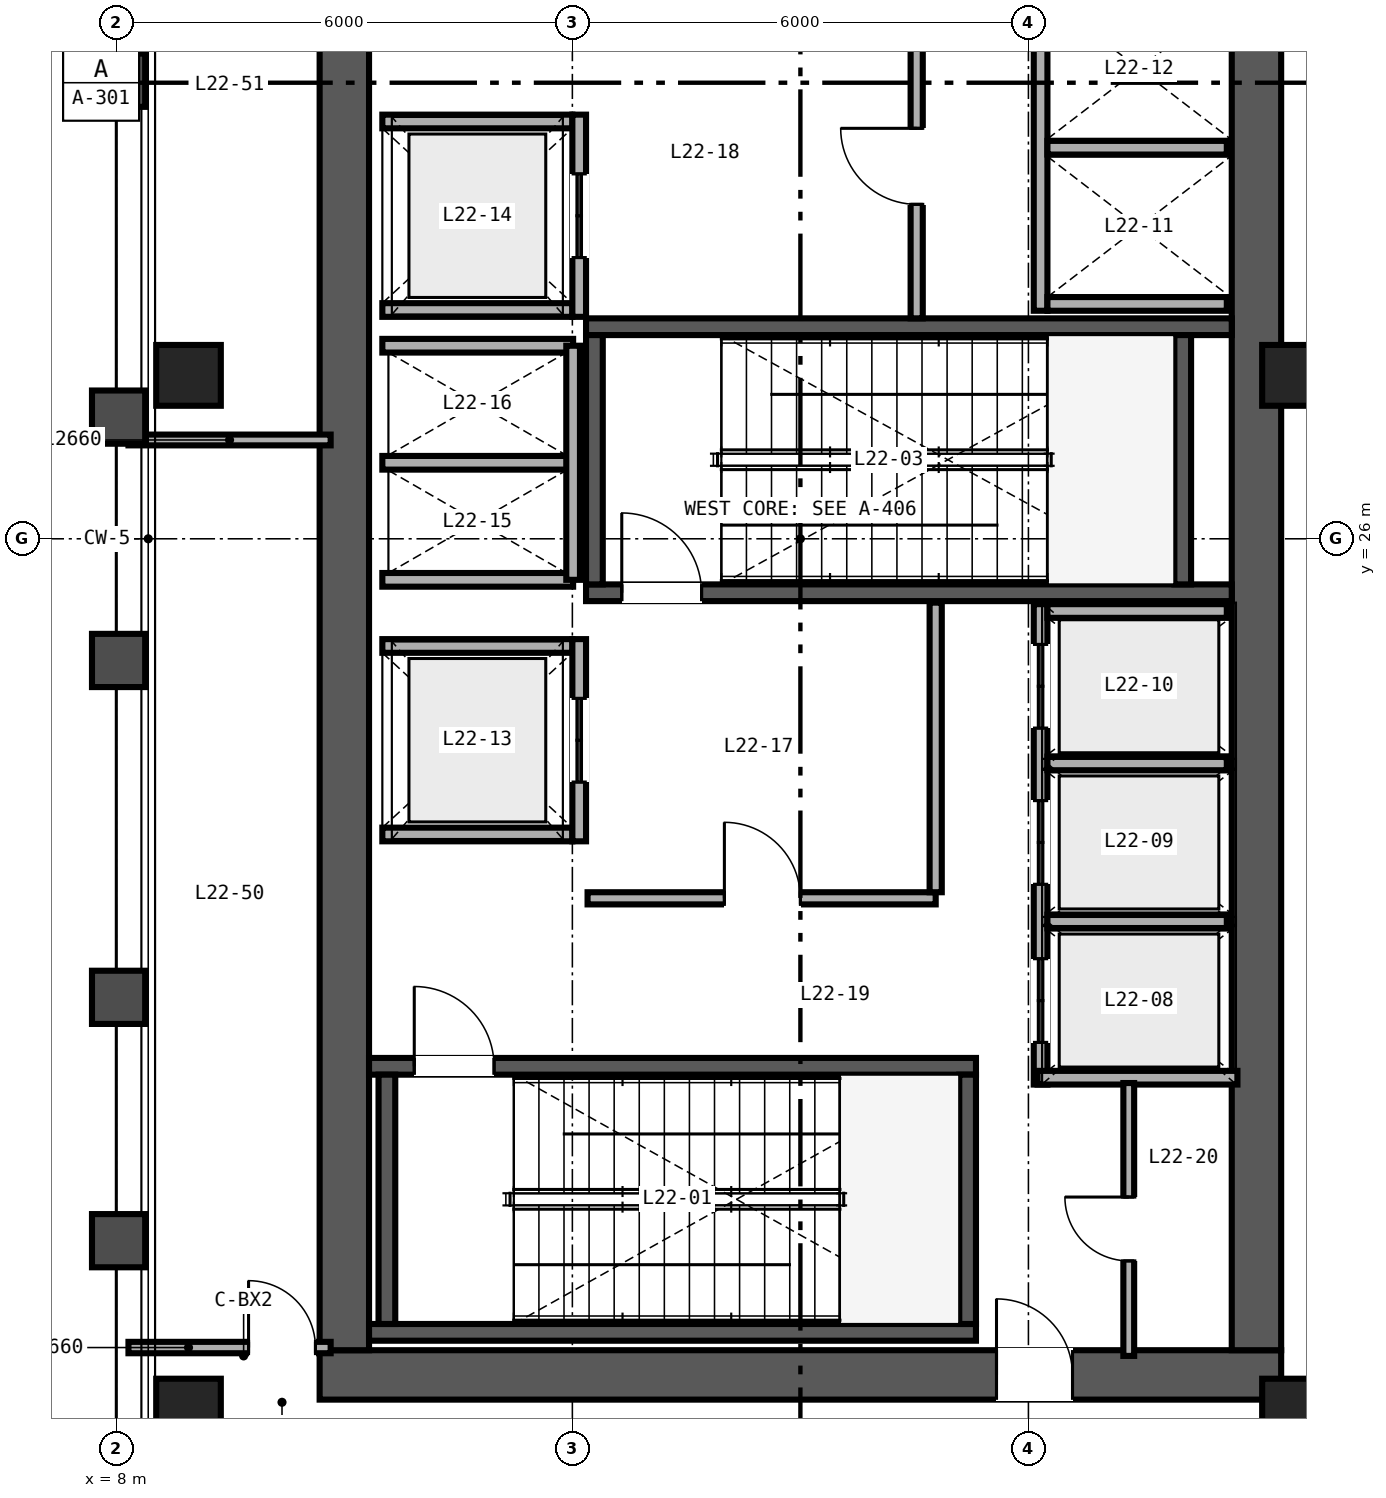
"""IFC4 building model, lengths in metres.
Left out: names, types, materials, properties, quantities, classifications, styles, units other than length and angle.
Written with IfcOpenShell. Run it as: python <this file> out.ifc"""

import sys

from ifc_helpers import new_model, si_unit, direction, frame, frame_2d, origin, origin_2d, place, context, subcontext, project, spatial, rectangle, hollow_rectangle, extrude, source, transform, mapped, element, fill, save


model = new_model("IFC4")
c1 = context("Model", 3, precision=1e-05, world=origin(), true_north=direction((0.0, 1.0)))
c2 = subcontext(c1, "Body", "Model", "MODEL_VIEW")
j1 = project(units=[si_unit("LENGTHUNIT", "METRE"), si_unit("PLANEANGLEUNIT", "RADIAN")], contexts=[c1])
p1 = place(None, origin())
s1 = spatial("IfcSite", under=j1, at=p1, CompositionType="ELEMENT")
p2 = place(p1, origin())
s2 = spatial("IfcBuilding", under=s1, at=p2, CompositionType="ELEMENT")
p3 = place(p2, frame((0.0, 0.0, 92.4)))
s3 = spatial("IfcBuildingStorey", under=s2, at=p3, CompositionType="ELEMENT", Elevation=92.4)
p4 = place(p3, frame((10.675, 15.0, 0.0), z_axis=(0.0, 0.0, 1.0), x_axis=(1.0, 0.0, 0.0)))
e1 = element("IfcWall", 1, at=p4, inside=s3, PredefinedType="SHEAR", context=c2, shape_type="SweptSolid", body=[
    extrude(rectangle(XDim=12.65, YDim=0.65, at=frame_2d((6.325, 0.0))), origin(), (0.0, 0.0, 1.0), 4.56),
])
p5 = place(p4, frame((8.905, 0.0, 0.0)))
e2 = element("IfcOpeningElement", 2, at=p5, cuts=e1, PredefinedType="OPENING", context=c2, shape_type="SweptSolid", body=[
    extrude(rectangle(XDim=1.0, YDim=2.15, at=frame_2d((0.5, 1.075))), frame((0.0, 0.335, 0.0), z_axis=(0.0, -1.0, 0.0), x_axis=(1.0, 0.0, 0.0)), (0.0, 0.0, 1.0), 0.67),
])
for number, where, z_axis, x_axis in (
    (3, (11.0, 15.325, 0.0), (0.0, 0.0, 1.0), (0.0, 1.0, 0.0)),
    (4, (23.0, 15.325, 0.0), (0.0, 0.0, 1.0), (0.0, 1.0, 0.0)),
):
    element("IfcWall", number, at=place(p3, frame(where, z_axis=z_axis, x_axis=x_axis)), inside=s3, PredefinedType="SHEAR", context=c2, shape_type="SweptSolid", body=[
        extrude(rectangle(XDim=21.35, YDim=0.65, at=frame_2d((10.675, 0.0))), origin(), (0.0, 0.0, 1.0), 4.56),
    ])
p6 = place(p3, frame((11.325, 15.56, 0.0), z_axis=(0.0, 0.0, 1.0), x_axis=(1.0, 0.0, 0.0)))
e5 = element("IfcWall", 5, at=p6, inside=s3, PredefinedType="SHEAR", context=c2, shape_type="SweptSolid", body=[
    extrude(rectangle(XDim=7.985, YDim=0.22, at=frame_2d((3.993, 0.0))), origin(), (0.0, 0.0, 1.0), 4.6),
])
p7 = place(p3, frame((11.325, 19.06, 0.0), z_axis=(0.0, 0.0, 1.0), x_axis=(1.0, 0.0, 0.0)))
e6 = element("IfcWall", 6, at=p7, inside=s3, PredefinedType="SHEAR", context=c2, shape_type="SweptSolid", body=[
    extrude(rectangle(XDim=7.985, YDim=0.22, at=frame_2d((3.993, 0.0))), origin(), (0.0, 0.0, 1.0), 4.6),
])
p8 = place(p7, frame((0.595, 0.0, 0.0)))
e7 = element("IfcOpeningElement", 7, at=p8, cuts=e6, PredefinedType="OPENING", context=c2, shape_type="SweptSolid", body=[
    extrude(rectangle(XDim=1.05, YDim=2.15, at=frame_2d((0.525, 1.075))), frame((0.0, 0.12, 0.0), z_axis=(0.0, -1.0, 0.0), x_axis=(1.0, 0.0, 0.0)), (0.0, 0.0, 1.0), 0.24),
])
for number, where, z_axis, x_axis in (
    (8, (11.56, 15.67, 0.0), (0.0, 0.0, 1.0), (0.0, 1.0, 0.0)),
    (9, (19.2, 15.67, 0.0), (0.0, 0.0, 1.0), (0.0, 1.0, 0.0)),
):
    element("IfcWall", number, at=place(p3, frame(where, z_axis=z_axis, x_axis=x_axis)), inside=s3, PredefinedType="SHEAR", context=c2, shape_type="SweptSolid", body=[
        extrude(rectangle(XDim=3.28, YDim=0.22, at=frame_2d((1.64, 0.0))), origin(), (0.0, 0.0, 1.0), 4.6),
    ])
p9 = place(p3, frame((14.18, 25.29, 0.0), z_axis=(0.0, 0.0, 1.0), x_axis=(1.0, 0.0, 0.0)))
e10 = element("IfcWall", 10, at=p9, inside=s3, PredefinedType="SHEAR", context=c2, shape_type="SweptSolid", body=[
    extrude(rectangle(XDim=8.495, YDim=0.22, at=frame_2d((4.248, 0.0))), origin(), (0.0, 0.0, 1.0), 4.6),
])
p10 = place(p9, frame((0.47, 0.0, 0.0)))
e11 = element("IfcOpeningElement", 11, at=p10, cuts=e10, PredefinedType="OPENING", context=c2, shape_type="SweptSolid", body=[
    extrude(rectangle(XDim=1.05, YDim=2.15, at=frame_2d((0.525, 1.075))), frame((0.0, 0.12, 0.0), z_axis=(0.0, -1.0, 0.0), x_axis=(1.0, 0.0, 0.0)), (0.0, 0.0, 1.0), 0.24),
])
p11 = place(p3, frame((14.18, 28.79, 0.0), z_axis=(0.0, 0.0, 1.0), x_axis=(1.0, 0.0, 0.0)))
e12 = element("IfcWall", 12, at=p11, inside=s3, PredefinedType="SHEAR", context=c2, shape_type="SweptSolid", body=[
    extrude(rectangle(XDim=8.495, YDim=0.22, at=frame_2d((4.248, 0.0))), origin(), (0.0, 0.0, 1.0), 4.6),
])
for number, where, z_axis, x_axis in (
    (13, (14.29, 25.4, 0.0), (0.0, 0.0, 1.0), (0.0, 1.0, 0.0)),
    (14, (22.03, 25.4, 0.0), (0.0, 0.0, 1.0), (0.0, 1.0, 0.0)),
):
    element("IfcWall", number, at=place(p3, frame(where, z_axis=z_axis, x_axis=x_axis)), inside=s3, PredefinedType="SHEAR", context=c2, shape_type="SweptSolid", body=[
        extrude(rectangle(XDim=3.28, YDim=0.22, at=frame_2d((1.64, 0.0))), origin(), (0.0, 0.0, 1.0), 4.6),
    ])
m1 = source(origin(), c2, "Body", "SweptSolid", [
    extrude(hollow_rectangle(XDim=0.85, YDim=0.8, WallThickness=0.032, at=origin_2d()), origin(), (0.0, 0.0, 1.0), 4.56),
])
for number, where, z_axis, x_axis in (
    (15, (8.95, 14.55, 0.0), (0.0, 0.0, 1.0), (1.0, 0.0, 0.0)),
    (16, (23.5, 14.55, 0.0), (0.0, 0.0, 1.0), (1.0, 0.0, 0.0)),
    (17, (8.95, 28.15, 0.0), (0.0, 0.0, 1.0), (1.0, 0.0, 0.0)),
    (18, (23.5, 28.15, 0.0), (0.0, 0.0, 1.0), (1.0, 0.0, 0.0)),
):
    element("IfcColumn", number, at=place(p3, frame(where, z_axis=z_axis, x_axis=x_axis)), inside=s3, PredefinedType="COLUMN", context=c2, shape_type="MappedRepresentation", body=[
        mapped(m1, transform((0.0, 0.0, 0.0), scale=1.0)),
    ])
p12 = place(p3, frame((20.16, 18.82, 0.0), z_axis=(0.0, 0.0, 1.0), x_axis=(0.0, 1.0, 0.0)))
e19 = element("IfcWall", 19, at=p12, inside=s3, PredefinedType="SOLIDWALL", context=c2, shape_type="SweptSolid", body=[
    extrude(rectangle(XDim=6.32, YDim=0.18, at=frame_2d((3.16, 0.0))), origin(), (0.0, 0.0, 1.0), 3.46),
])
p13 = place(p12, frame((0.555, 0.0, 0.0)))
e20 = element("IfcOpeningElement", 20, at=p13, cuts=e19, PredefinedType="OPENING", context=c2, shape_type="SweptSolid", body=[
    extrude(rectangle(XDim=1.1, YDim=2.2, at=frame_2d((0.55, 1.1))), frame((0.0, 0.1, 0.0), z_axis=(0.0, -1.0, 0.0), x_axis=(1.0, 0.0, 0.0)), (0.0, 0.0, 1.0), 0.2),
])
p14 = place(p12, frame((2.635, 0.0, 0.0)))
e21 = element("IfcOpeningElement", 21, at=p14, cuts=e19, PredefinedType="OPENING", context=c2, shape_type="SweptSolid", body=[
    extrude(rectangle(XDim=1.1, YDim=2.2, at=frame_2d((0.55, 1.1))), frame((0.0, 0.1, 0.0), z_axis=(0.0, -1.0, 0.0), x_axis=(1.0, 0.0, 0.0)), (0.0, 0.0, 1.0), 0.2),
])
p15 = place(p12, frame((4.69, 0.0, 0.0)))
e22 = element("IfcOpeningElement", 22, at=p15, cuts=e19, PredefinedType="OPENING", context=c2, shape_type="SweptSolid", body=[
    extrude(rectangle(XDim=1.1, YDim=2.2, at=frame_2d((0.55, 1.1))), frame((0.0, 0.1, 0.0), z_axis=(0.0, -1.0, 0.0), x_axis=(1.0, 0.0, 0.0)), (0.0, 0.0, 1.0), 0.2),
])
p16 = place(p3, frame((20.12, 18.91, 0.0), z_axis=(0.0, 0.0, 1.0), x_axis=(1.0, 0.0, 0.0)))
e23 = element("IfcWall", 23, at=p16, inside=s3, PredefinedType="SOLIDWALL", context=c2, shape_type="SweptSolid", body=[
    extrude(rectangle(XDim=2.63, YDim=0.18, at=frame_2d((1.315, 0.0))), origin(), (0.0, 0.0, 1.0), 4.56),
])
p17 = place(p3, frame((20.25, 25.05, 0.0), z_axis=(0.0, 0.0, 1.0), x_axis=(1.0, 0.0, 0.0)))
e24 = element("IfcWall", 24, at=p17, inside=s3, PredefinedType="SOLIDWALL", context=c2, shape_type="SweptSolid", body=[
    extrude(rectangle(XDim=2.36, YDim=0.18, at=frame_2d((1.18, 0.0))), origin(), (0.0, 0.0, 1.0), 4.56),
])
p18 = place(p3, frame((20.25, 20.965, 0.0), z_axis=(0.0, 0.0, 1.0), x_axis=(1.0, 0.0, 0.0)))
e25 = element("IfcWall", 25, at=p18, inside=s3, PredefinedType="SOLIDWALL", context=c2, shape_type="SweptSolid", body=[
    extrude(rectangle(XDim=2.36, YDim=0.18, at=frame_2d((1.18, 0.0))), origin(), (0.0, 0.0, 1.0), 3.46),
])
p19 = place(p3, frame((20.25, 23.045, 0.0), z_axis=(0.0, 0.0, 1.0), x_axis=(1.0, 0.0, 0.0)))
e26 = element("IfcWall", 26, at=p19, inside=s3, PredefinedType="SOLIDWALL", context=c2, shape_type="SweptSolid", body=[
    extrude(rectangle(XDim=2.36, YDim=0.18, at=frame_2d((1.18, 0.0))), origin(), (0.0, 0.0, 1.0), 4.56),
])
p20 = place(p3, frame((20.16, 29.0, 0.0), z_axis=(0.0, 0.0, 1.0), x_axis=(0.0, 1.0, 0.0)))
e27 = element("IfcWall", 27, at=p20, inside=s3, PredefinedType="SOLIDWALL", context=c2, shape_type="SweptSolid", body=[
    extrude(rectangle(XDim=4.29, YDim=0.18, at=frame_2d((2.145, 0.0))), origin(), (0.0, 0.0, 1.0), 4.56),
])
for number, where, z_axis, x_axis in (
    (28, (20.25, 29.09, 0.0), (0.0, 0.0, 1.0), (1.0, 0.0, 0.0)),
    (29, (20.25, 31.145, 0.0), (0.0, 0.0, 1.0), (1.0, 0.0, 0.0)),
):
    element("IfcWall", number, at=place(p3, frame(where, z_axis=z_axis, x_axis=x_axis)), inside=s3, PredefinedType="SOLIDWALL", context=c2, shape_type="SweptSolid", body=[
        extrude(rectangle(XDim=2.36, YDim=0.18, at=frame_2d((1.18, 0.0))), origin(), (0.0, 0.0, 1.0), 4.56),
    ])
for number, where, z_axis, x_axis in (
    (30, (11.5, 22.11, 0.0), (0.0, 0.0, 1.0), (1.0, 0.0, 0.0)),
    (31, (11.5, 24.59, 0.0), (0.0, 0.0, 1.0), (1.0, 0.0, 0.0)),
):
    element("IfcWall", number, at=place(p3, frame(where, z_axis=z_axis, x_axis=x_axis)), inside=s3, PredefinedType="SOLIDWALL", context=c2, shape_type="SweptSolid", body=[
        extrude(rectangle(XDim=2.5, YDim=0.18, at=frame_2d((1.25, 0.0))), origin(), (0.0, 0.0, 1.0), 4.56),
    ])
p21 = place(p3, frame((14.09, 22.02, 0.0), z_axis=(0.0, 0.0, 1.0), x_axis=(0.0, 1.0, 0.0)))
e32 = element("IfcWall", 32, at=p21, inside=s3, PredefinedType="SOLIDWALL", context=c2, shape_type="SweptSolid", body=[
    extrude(rectangle(XDim=2.66, YDim=0.18, at=frame_2d((1.33, 0.0))), origin(), (0.0, 0.0, 1.0), 4.56),
])
p22 = place(p21, frame((0.78, 0.0, 0.0)))
e33 = element("IfcOpeningElement", 33, at=p22, cuts=e32, PredefinedType="OPENING", context=c2, shape_type="SweptSolid", body=[
    extrude(rectangle(XDim=1.1, YDim=2.2, at=frame_2d((0.55, 1.1))), frame((0.0, 0.1, 0.0), z_axis=(0.0, -1.0, 0.0), x_axis=(1.0, 0.0, 0.0)), (0.0, 0.0, 1.0), 0.2),
])
for number, where, z_axis, x_axis in (
    (34, (11.5, 29.01, 0.0), (0.0, 0.0, 1.0), (1.0, 0.0, 0.0)),
    (35, (11.5, 31.49, 0.0), (0.0, 0.0, 1.0), (1.0, 0.0, 0.0)),
):
    element("IfcWall", number, at=place(p3, frame(where, z_axis=z_axis, x_axis=x_axis)), inside=s3, PredefinedType="SOLIDWALL", context=c2, shape_type="SweptSolid", body=[
        extrude(rectangle(XDim=2.5, YDim=0.18, at=frame_2d((1.25, 0.0))), origin(), (0.0, 0.0, 1.0), 4.56),
    ])
p23 = place(p3, frame((14.09, 28.92, 0.0), z_axis=(0.0, 0.0, 1.0), x_axis=(0.0, 1.0, 0.0)))
e36 = element("IfcWall", 36, at=p23, inside=s3, PredefinedType="SOLIDWALL", context=c2, shape_type="SweptSolid", body=[
    extrude(rectangle(XDim=2.66, YDim=0.18, at=frame_2d((1.33, 0.0))), origin(), (0.0, 0.0, 1.0), 4.56),
])
p24 = place(p23, frame((0.78, 0.0, 0.0)))
e37 = element("IfcOpeningElement", 37, at=p24, cuts=e36, PredefinedType="OPENING", context=c2, shape_type="SweptSolid", body=[
    extrude(rectangle(XDim=1.1, YDim=2.2, at=frame_2d((0.55, 1.1))), frame((0.0, 0.1, 0.0), z_axis=(0.0, -1.0, 0.0), x_axis=(1.0, 0.0, 0.0)), (0.0, 0.0, 1.0), 0.2),
])
for number, where, z_axis, x_axis in (
    (38, (11.5, 25.46, 0.0), (0.0, 0.0, 1.0), (1.0, 0.0, 0.0)),
    (39, (11.5, 27.0, 0.0), (0.0, 0.0, 1.0), (1.0, 0.0, 0.0)),
    (40, (11.5, 28.54, 0.0), (0.0, 0.0, 1.0), (1.0, 0.0, 0.0)),
):
    element("IfcWall", number, at=place(p3, frame(where, z_axis=z_axis, x_axis=x_axis)), inside=s3, PredefinedType="SOLIDWALL", context=c2, shape_type="SweptSolid", body=[
        extrude(rectangle(XDim=2.51, YDim=0.18, at=frame_2d((1.255, 0.0))), origin(), (0.0, 0.0, 1.0), 4.56),
    ])
p25 = place(p3, frame((14.01, 25.46, 0.0), z_axis=(0.0, 0.0, 1.0), x_axis=(0.0, 1.0, 0.0)))
e41 = element("IfcWall", 41, at=p25, inside=s3, PredefinedType="SOLIDWALL", context=c2, shape_type="SweptSolid", body=[
    extrude(rectangle(XDim=3.08, YDim=0.18, at=frame_2d((1.54, 0.0))), origin(), (0.0, 0.0, 1.0), 4.56),
])
p26 = place(p3, frame((14.2, 21.27, 0.0), z_axis=(0.0, 0.0, 1.0), x_axis=(1.0, 0.0, 0.0)))
e42 = element("IfcWall", 42, at=p26, inside=s3, PredefinedType="PARTITIONING", context=c2, shape_type="SweptSolid", body=[
    extrude(rectangle(XDim=4.58, YDim=0.16, at=frame_2d((2.29, 0.0))), origin(), (0.0, 0.0, 1.0), 4.56),
])
p27 = place(p26, frame((1.8, 0.0, 0.0)))
e43 = element("IfcOpeningElement", 43, at=p27, cuts=e42, PredefinedType="OPENING", context=c2, shape_type="SweptSolid", body=[
    extrude(rectangle(XDim=1.0, YDim=2.15, at=frame_2d((0.5, 1.075))), frame((0.0, 0.09, 0.0), z_axis=(0.0, -1.0, 0.0), x_axis=(1.0, 0.0, 0.0)), (0.0, 0.0, 1.0), 0.18),
])
p28 = place(p3, frame((18.78, 21.35, 0.0), z_axis=(0.0, 0.0, 1.0), x_axis=(0.0, 1.0, 0.0)))
e44 = element("IfcWall", 44, at=p28, inside=s3, PredefinedType="PARTITIONING", context=c2, shape_type="SweptSolid", body=[
    extrude(rectangle(XDim=3.81, YDim=0.16, at=frame_2d((1.905, 0.0))), origin(), (0.0, 0.0, 1.0), 4.56),
])
p29 = place(p3, frame((18.53, 28.9, 0.0), z_axis=(0.0, 0.0, 1.0), x_axis=(0.0, 1.0, 0.0)))
e45 = element("IfcWall", 45, at=p29, inside=s3, PredefinedType="PARTITIONING", context=c2, shape_type="SweptSolid", body=[
    extrude(rectangle(XDim=3.9, YDim=0.16, at=frame_2d((1.95, 0.0))), origin(), (0.0, 0.0, 1.0), 4.56),
])
p30 = place(p29, frame((1.5, 0.0, 0.0)))
e46 = element("IfcOpeningElement", 46, at=p30, cuts=e45, PredefinedType="OPENING", context=c2, shape_type="SweptSolid", body=[
    extrude(rectangle(XDim=1.0, YDim=2.15, at=frame_2d((0.5, 1.075))), frame((0.0, 0.09, 0.0), z_axis=(0.0, -1.0, 0.0), x_axis=(1.0, 0.0, 0.0)), (0.0, 0.0, 1.0), 0.18),
])
p31 = place(p3, frame((21.32, 15.25, 0.0), z_axis=(0.0, 0.0, 1.0), x_axis=(0.0, 1.0, 0.0)))
e47 = element("IfcWall", 47, at=p31, inside=s3, PredefinedType="PARTITIONING", context=c2, shape_type="SweptSolid", body=[
    extrude(rectangle(XDim=3.59, YDim=0.142, at=frame_2d((1.795, 0.0))), origin(), (0.0, 0.0, 1.0), 4.56),
])
p32 = place(p31, frame((1.25, 0.0, 0.0)))
e48 = element("IfcOpeningElement", 48, at=p32, cuts=e47, PredefinedType="OPENING", context=c2, shape_type="SweptSolid", body=[
    extrude(rectangle(XDim=0.84, YDim=2.1, at=frame_2d((0.42, 1.05))), frame((0.0, 0.081, 0.0), z_axis=(0.0, -1.0, 0.0), x_axis=(1.0, 0.0, 0.0)), (0.0, 0.0, 1.0), 0.162),
])
p33 = place(p3, frame((8.16, 15.36, 0.0), z_axis=(0.0, 0.0, 1.0), x_axis=(1.0, 0.0, 0.0)))
e49 = element("IfcWall", 49, at=p33, inside=s3, PredefinedType="PARTITIONING", context=c2, shape_type="SweptSolid", body=[
    extrude(rectangle(XDim=2.66, YDim=0.15, at=frame_2d((1.33, 0.0))), origin(), (0.0, 0.0, 1.0), 3.781),
])
p34 = place(p33, frame((1.58, 0.0, 0.0)))
e50 = element("IfcOpeningElement", 50, at=p34, cuts=e49, PredefinedType="OPENING", context=c2, shape_type="SweptSolid", body=[
    extrude(rectangle(XDim=0.88, YDim=2.15, at=frame_2d((0.44, 1.075))), frame((0.0, 0.085, 0.0), z_axis=(0.0, -1.0, 0.0), x_axis=(1.0, 0.0, 0.0)), (0.0, 0.0, 1.0), 0.17),
])
p35 = place(p3, frame((8.16, 27.3, 0.0), z_axis=(0.0, 0.0, 1.0), x_axis=(1.0, 0.0, 0.0)))
e51 = element("IfcWall", 51, at=p35, inside=s3, PredefinedType="PARTITIONING", context=c2, shape_type="SweptSolid", body=[
    extrude(rectangle(XDim=2.66, YDim=0.142, at=frame_2d((1.33, 0.0))), origin(), (0.0, 0.0, 1.0), 3.781),
])
m2 = source(origin(), c2, "Body", "SweptSolid", [
    extrude(rectangle(XDim=1.05, YDim=2.15, at=frame_2d((0.525, 1.075))), frame((0.0, 0.025, 0.0), z_axis=(0.0, -1.0, 0.0), x_axis=(1.0, 0.0, 0.0)), (0.0, 0.0, 1.0), 0.05),
])
p36 = place(p8, origin())
e52 = element("IfcDoor", 52, at=p36, inside=s3, OperationType="SINGLE_SWING_LEFT", PredefinedType="DOOR", context=c2, shape_type="MappedRepresentation", body=[
    mapped(m2, transform((0.0, 0.0, 0.0), scale=1.0)),
])
fill(e7, e52)
p37 = place(p10, origin())
e53 = element("IfcDoor", 53, at=p37, inside=s3, OperationType="SINGLE_SWING_LEFT", PredefinedType="DOOR", context=c2, shape_type="MappedRepresentation", body=[
    mapped(m2, transform((0.0, 0.0, 0.0), scale=1.0)),
])
fill(e11, e53)
m3 = source(origin(), c2, "Body", "SweptSolid", [
    extrude(rectangle(XDim=1.1, YDim=2.2, at=frame_2d((0.55, 1.1))), frame((0.0, 0.025, 0.0), z_axis=(0.0, -1.0, 0.0), x_axis=(1.0, 0.0, 0.0)), (0.0, 0.0, 1.0), 0.05),
])
p38 = place(p13, origin())
e54 = element("IfcDoor", 54, at=p38, inside=s3, OperationType="DOUBLE_DOOR_SLIDING", PredefinedType="DOOR", context=c2, shape_type="MappedRepresentation", body=[
    mapped(m3, transform((0.0, 0.0, 0.0), scale=1.0)),
])
fill(e20, e54)
p39 = place(p14, origin())
e55 = element("IfcDoor", 55, at=p39, inside=s3, OperationType="DOUBLE_DOOR_SLIDING", PredefinedType="DOOR", context=c2, shape_type="MappedRepresentation", body=[
    mapped(m3, transform((0.0, 0.0, 0.0), scale=1.0)),
])
fill(e21, e55)
p40 = place(p15, origin())
e56 = element("IfcDoor", 56, at=p40, inside=s3, OperationType="DOUBLE_DOOR_SLIDING", PredefinedType="DOOR", context=c2, shape_type="MappedRepresentation", body=[
    mapped(m3, transform((0.0, 0.0, 0.0), scale=1.0)),
])
fill(e22, e56)
p41 = place(p22, origin())
e57 = element("IfcDoor", 57, at=p41, inside=s3, OperationType="DOUBLE_DOOR_SLIDING", PredefinedType="DOOR", context=c2, shape_type="MappedRepresentation", body=[
    mapped(m3, transform((0.0, 0.0, 0.0), scale=1.0)),
])
fill(e33, e57)
p42 = place(p24, origin())
e58 = element("IfcDoor", 58, at=p42, inside=s3, OperationType="DOUBLE_DOOR_SLIDING", PredefinedType="DOOR", context=c2, shape_type="MappedRepresentation", body=[
    mapped(m3, transform((0.0, 0.0, 0.0), scale=1.0)),
])
fill(e37, e58)
m4 = source(origin(), c2, "Body", "SweptSolid", [
    extrude(rectangle(XDim=1.0, YDim=2.15, at=frame_2d((0.5, 1.075))), frame((0.0, 0.025, 0.0), z_axis=(0.0, -1.0, 0.0), x_axis=(1.0, 0.0, 0.0)), (0.0, 0.0, 1.0), 0.05),
])
p43 = place(p27, origin())
e59 = element("IfcDoor", 59, at=p43, inside=s3, OperationType="SINGLE_SWING_LEFT", PredefinedType="DOOR", context=c2, shape_type="MappedRepresentation", body=[
    mapped(m4, transform((0.0, 0.0, 0.0), scale=1.0)),
])
fill(e43, e59)
p44 = place(p30, origin())
e60 = element("IfcDoor", 60, at=p44, inside=s3, OperationType="SINGLE_SWING_RIGHT", PredefinedType="DOOR", context=c2, shape_type="MappedRepresentation", body=[
    mapped(m4, transform((0.0, 0.0, 0.0), scale=1.0)),
])
fill(e46, e60)
m5 = source(origin(), c2, "Body", "SweptSolid", [
    extrude(rectangle(XDim=0.84, YDim=2.1, at=frame_2d((0.42, 1.05))), frame((0.0, 0.025, 0.0), z_axis=(0.0, -1.0, 0.0), x_axis=(1.0, 0.0, 0.0)), (0.0, 0.0, 1.0), 0.05),
])
p45 = place(p32, origin())
e61 = element("IfcDoor", 61, at=p45, inside=s3, OperationType="SINGLE_SWING_RIGHT", PredefinedType="DOOR", context=c2, shape_type="MappedRepresentation", body=[
    mapped(m5, transform((0.0, 0.0, 0.0), scale=1.0)),
])
fill(e48, e61)
p46 = place(p5, origin())
e62 = element("IfcDoor", 62, at=p46, inside=s3, OperationType="SINGLE_SWING_LEFT", PredefinedType="DOOR", context=c2, shape_type="MappedRepresentation", body=[
    mapped(m4, transform((0.0, 0.0, 0.0), scale=1.0)),
])
fill(e2, e62)
m6 = source(origin(), c2, "Body", "SweptSolid", [
    extrude(rectangle(XDim=0.88, YDim=2.15, at=frame_2d((0.44, 1.075))), frame((0.0, 0.025, 0.0), z_axis=(0.0, -1.0, 0.0), x_axis=(1.0, 0.0, 0.0)), (0.0, 0.0, 1.0), 0.05),
])
p47 = place(p34, origin())
e63 = element("IfcDoor", 63, at=p47, inside=s3, OperationType="SINGLE_SWING_LEFT", PredefinedType="DOOR", context=c2, shape_type="MappedRepresentation", body=[
    mapped(m6, transform((0.0, 0.0, 0.0), scale=1.0)),
])
fill(e50, e63)
save(model, sys.argv[1])
